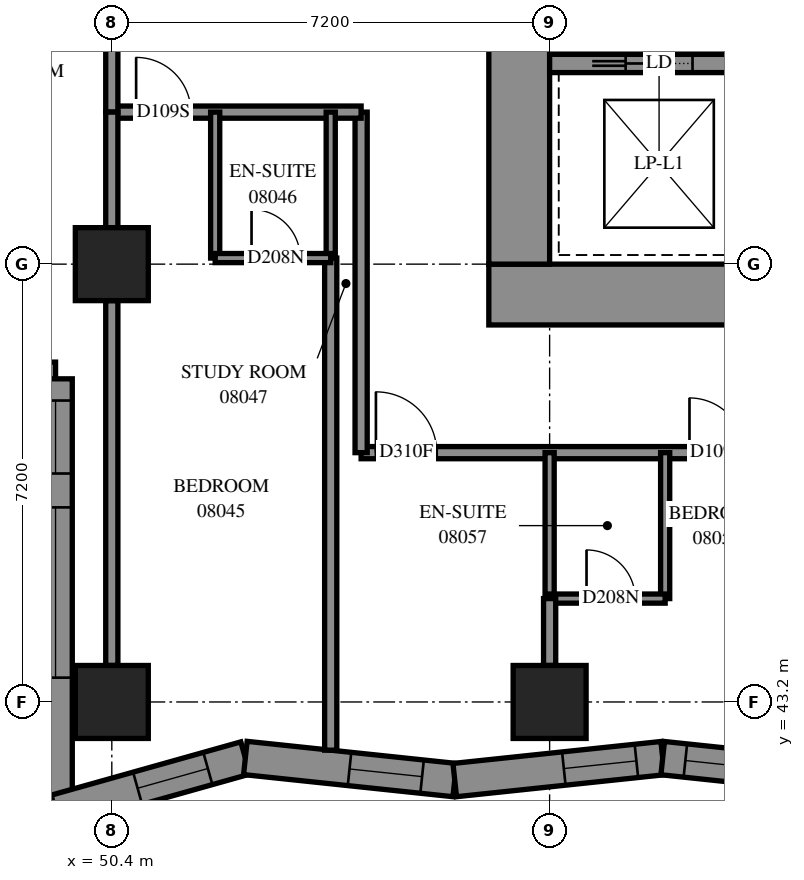
"""IFC4 building model, lengths in metres.
Left out: names, types, materials, properties, quantities, classifications, styles, units other than length and angle.
Written with IfcOpenShell. Run it as: python <this file> out.ifc"""

import sys

from ifc_helpers import new_model, si_unit, direction, frame, frame_2d, origin, origin_2d, place, context, subcontext, project, spatial, polyline, rectangle, outline, extrude, element, fill, save


model = new_model("IFC4")
c1 = context("Model", 3, precision=1e-05, world=origin(), true_north=direction((0.0, 1.0)))
c2 = subcontext(c1, "Body", "Model", "MODEL_VIEW")
j1 = project(units=[si_unit("LENGTHUNIT", "METRE"), si_unit("PLANEANGLEUNIT", "RADIAN")], contexts=[c1])
p1 = place(None, origin())
s1 = spatial("IfcSite", under=j1, at=p1, CompositionType="ELEMENT")
p2 = place(p1, origin())
s2 = spatial("IfcBuilding", under=s1, at=p2, CompositionType="ELEMENT")
p3 = place(p2, frame((0.0, 0.0, 33.8)))
s3 = spatial("IfcBuildingStorey", under=s2, at=p3, CompositionType="ELEMENT", Elevation=33.8)
for number, where, z_axis, x_axis in (
    (1, (50.4, 43.2, 0.0), (0.0, 0.0, 1.0), (1.0, 0.0, 0.0)),
    (2, (50.4, 50.4, 0.0), (0.0, 0.0, 1.0), (1.0, 0.0, 0.0)),
    (3, (57.6, 43.2, 0.0), (0.0, 0.0, 1.0), (1.0, 0.0, 0.0)),
):
    element("IfcColumn", number, at=place(p3, frame(where, z_axis=z_axis, x_axis=x_axis)), inside=s3, PredefinedType="COLUMN", context=c2, shape_type="SweptSolid", body=[
        extrude(rectangle(XDim=1.2, YDim=1.2, at=origin_2d()), origin(), (0.0, 0.0, 1.0), 3.1),
    ])
p4 = place(p3, frame((56.6, 49.9, -0.3), z_axis=(0.0, 0.0, 1.0), x_axis=(1.0, 0.0, 0.0)))
e4 = element("IfcWall", 4, at=p4, inside=s3, PredefinedType="SHEAR", context=c2, shape_type="SweptSolid", body=[
    extrude(rectangle(XDim=16.4, YDim=1.0, at=frame_2d((8.2, 0.0))), origin(), (0.0, 0.0, 1.0), 2.7),
])
p5 = place(p3, frame((57.1, 50.4, -0.3), z_axis=(0.0, 0.0, 1.0), x_axis=(0.0, 1.0, 0.0)))
e5 = element("IfcWall", 5, at=p5, inside=s3, PredefinedType="SHEAR", context=c2, shape_type="SweptSolid", body=[
    extrude(rectangle(XDim=14.4, YDim=1.0, at=frame_2d((7.2, 0.0))), origin(), (0.0, 0.0, 1.0), 2.7),
])
p6 = place(p5, frame((4.55, 0.0, 0.3)))
e6 = element("IfcOpeningElement", 6, at=p6, cuts=e5, PredefinedType="OPENING", context=c2, shape_type="SweptSolid", body=[
    extrude(rectangle(XDim=1.1, YDim=2.1, at=frame_2d((0.55, 1.05))), frame((0.0, 0.51, 0.0), z_axis=(0.0, -1.0, 0.0), x_axis=(1.0, 0.0, 0.0)), (0.0, 0.0, 1.0), 1.02),
])
p7 = place(p5, frame((11.35, 0.0, 0.3)))
e7 = element("IfcOpeningElement", 7, at=p7, cuts=e5, PredefinedType="OPENING", context=c2, shape_type="SweptSolid", body=[
    extrude(rectangle(XDim=1.1, YDim=2.1, at=frame_2d((0.55, 1.05))), frame((0.0, 0.51, 0.0), z_axis=(0.0, -1.0, 0.0), x_axis=(1.0, 0.0, 0.0)), (0.0, 0.0, 1.0), 1.02),
])
p8 = place(p3, frame((57.6, 53.7, 0.0), z_axis=(0.0, 0.0, 1.0), x_axis=(1.0, 0.0, 0.0)))
e8 = element("IfcWall", 8, at=p8, inside=s3, PredefinedType="SOLIDWALL", context=c2, shape_type="SweptSolid", body=[
    extrude(rectangle(XDim=14.4, YDim=0.3, at=frame_2d((7.2, 0.0))), origin(), (0.0, 0.0, 1.0), 3.1),
])
p9 = place(p8, frame((1.25, 0.0, 0.0)))
e9 = element("IfcOpeningElement", 9, at=p9, cuts=e8, PredefinedType="OPENING", context=c2, shape_type="SweptSolid", body=[
    extrude(rectangle(XDim=1.1, YDim=2.1, at=frame_2d((0.55, 1.05))), frame((0.0, 0.16, 0.0), z_axis=(0.0, -1.0, 0.0), x_axis=(1.0, 0.0, 0.0)), (0.0, 0.0, 1.0), 0.32),
])
p10 = place(p8, frame((4.85, 0.0, 0.0)))
e10 = element("IfcOpeningElement", 10, at=p10, cuts=e8, PredefinedType="OPENING", context=c2, shape_type="SweptSolid", body=[
    extrude(rectangle(XDim=1.1, YDim=2.1, at=frame_2d((0.55, 1.05))), frame((0.0, 0.16, 0.0), z_axis=(0.0, -1.0, 0.0), x_axis=(1.0, 0.0, 0.0)), (0.0, 0.0, 1.0), 0.32),
])
p11 = place(p8, frame((8.45, 0.0, 0.0)))
e11 = element("IfcOpeningElement", 11, at=p11, cuts=e8, PredefinedType="OPENING", context=c2, shape_type="SweptSolid", body=[
    extrude(rectangle(XDim=1.1, YDim=2.1, at=frame_2d((0.55, 1.05))), frame((0.0, 0.16, 0.0), z_axis=(0.0, -1.0, 0.0), x_axis=(1.0, 0.0, 0.0)), (0.0, 0.0, 1.0), 0.32),
])
p12 = place(p8, frame((12.05, 0.0, 0.0)))
e12 = element("IfcOpeningElement", 12, at=p12, cuts=e8, PredefinedType="OPENING", context=c2, shape_type="SweptSolid", body=[
    extrude(rectangle(XDim=1.1, YDim=2.1, at=frame_2d((0.55, 1.05))), frame((0.0, 0.16, 0.0), z_axis=(0.0, -1.0, 0.0), x_axis=(1.0, 0.0, 0.0)), (0.0, 0.0, 1.0), 0.32),
])
p13 = place(p3, frame((35.075, 48.514, 0.0), z_axis=(0.0, 0.0, 1.0), x_axis=(1.0, 0.0, 0.0)))
e13 = element("IfcWall", 13, at=p13, inside=s3, PredefinedType="SOLIDWALL", context=c2, shape_type="SweptSolid", body=[
    extrude(outline(polyline([(-0.275, -0.275), (14.125, -0.275), (14.675, 0.275), (0.275, 0.275), (-0.275, -0.275)])), origin(), (0.0, 0.0, 1.0), 3.1),
])
p14 = place(p13, frame((1.325, 0.0, 0.5)))
e14 = element("IfcOpeningElement", 14, at=p14, cuts=e13, PredefinedType="OPENING", context=c2, shape_type="SweptSolid", body=[
    extrude(rectangle(XDim=2.8, YDim=2.45, at=frame_2d((1.4, 1.225))), frame((0.0, 0.285, 0.0), z_axis=(0.0, -1.0, 0.0), x_axis=(1.0, 0.0, 0.0)), (0.0, 0.0, 1.0), 0.57),
])
p15 = place(p13, frame((4.925, 0.0, 0.5)))
e15 = element("IfcOpeningElement", 15, at=p15, cuts=e13, PredefinedType="OPENING", context=c2, shape_type="SweptSolid", body=[
    extrude(rectangle(XDim=2.8, YDim=2.45, at=frame_2d((1.4, 1.225))), frame((0.0, 0.285, 0.0), z_axis=(0.0, -1.0, 0.0), x_axis=(1.0, 0.0, 0.0)), (0.0, 0.0, 1.0), 0.57),
])
p16 = place(p13, frame((8.275, 0.0, 0.5)))
e16 = element("IfcOpeningElement", 16, at=p16, cuts=e13, PredefinedType="OPENING", context=c2, shape_type="SweptSolid", body=[
    extrude(rectangle(XDim=2.8, YDim=2.45, at=frame_2d((1.4, 1.225))), frame((0.0, 0.285, 0.0), z_axis=(0.0, -1.0, 0.0), x_axis=(1.0, 0.0, 0.0)), (0.0, 0.0, 1.0), 0.57),
])
p17 = place(p13, frame((12.363, 0.0, 0.5)))
e17 = element("IfcOpeningElement", 17, at=p17, cuts=e13, PredefinedType="OPENING", context=c2, shape_type="SweptSolid", body=[
    extrude(rectangle(XDim=1.2, YDim=2.45, at=frame_2d((0.6, 1.225))), frame((0.0, 0.285, 0.0), z_axis=(0.0, -1.0, 0.0), x_axis=(1.0, 0.0, 0.0)), (0.0, 0.0, 1.0), 0.57),
])
p18 = place(p3, frame((49.475, 48.514, 0.0), z_axis=(0.0, 0.0, 1.0), x_axis=(0.0, -1.0, 0.0)))
e18 = element("IfcWall", 18, at=p18, inside=s3, PredefinedType="SOLIDWALL", context=c2, shape_type="SweptSolid", body=[
    extrude(outline(polyline([(0.275, -0.275), (7.475, -0.275), (6.749, 0.275), (-0.275, 0.275), (0.275, -0.275)])), origin(), (0.0, 0.0, 1.0), 3.1),
])
p19 = place(p18, frame((2.114, 0.0, 0.5)))
e19 = element("IfcOpeningElement", 19, at=p19, cuts=e18, PredefinedType="OPENING", context=c2, shape_type="SweptSolid", body=[
    extrude(rectangle(XDim=2.8, YDim=2.45, at=frame_2d((1.4, 1.225))), frame((0.0, 0.285, 0.0), z_axis=(0.0, -1.0, 0.0), x_axis=(1.0, 0.0, 0.0)), (0.0, 0.0, 1.0), 0.57),
])
p20 = place(p18, frame((0.357, 0.0, 0.5)))
e20 = element("IfcOpeningElement", 20, at=p20, cuts=e18, PredefinedType="OPENING", context=c2, shape_type="SweptSolid", body=[
    extrude(rectangle(XDim=1.2, YDim=2.45, at=frame_2d((0.6, 1.225))), frame((0.0, 0.285, 0.0), z_axis=(0.0, -1.0, 0.0), x_axis=(1.0, 0.0, 0.0)), (0.0, 0.0, 1.0), 0.57),
])
p21 = place(p3, frame((49.475, 41.402, 0.0), z_axis=(0.0, 0.0, 1.0), x_axis=(0.9627079474, 0.2705428024, 0.0)))
e21 = element("IfcWall", 21, at=p21, inside=s3, PredefinedType="SOLIDWALL", context=c2, shape_type="SweptSolid", body=[
    extrude(outline(polyline([(-0.363, -0.275), (3.189, -0.275), (3.295, 0.275), (0.363, 0.275), (-0.363, -0.275)])), origin(), (0.0, 0.0, 1.0), 3.1),
])
p22 = place(p21, frame((1.401, 0.0, 0.5)))
e22 = element("IfcOpeningElement", 22, at=p22, cuts=e21, PredefinedType="OPENING", context=c2, shape_type="SweptSolid", body=[
    extrude(rectangle(XDim=1.2, YDim=2.45, at=frame_2d((0.6, 1.225))), frame((0.0, 0.285, 0.0), z_axis=(0.0, -1.0, 0.0), x_axis=(1.0, 0.0, 0.0)), (0.0, 0.0, 1.0), 0.57),
])
p23 = place(p3, frame((52.596, 42.279, 0.0), z_axis=(0.0, 0.0, 1.0), x_axis=(0.9944742336, -0.1049809444, 0.0)))
e23 = element("IfcWall", 23, at=p23, inside=s3, PredefinedType="SOLIDWALL", context=c2, shape_type="SweptSolid", body=[
    extrude(outline(polyline([(0.053, -0.275), (3.491, -0.275), (3.433, 0.275), (-0.053, 0.275), (0.053, -0.275)])), origin(), (0.0, 0.0, 1.0), 3.1),
])
p24 = place(p23, frame((1.723, 0.0, 0.5)))
e24 = element("IfcOpeningElement", 24, at=p24, cuts=e23, PredefinedType="OPENING", context=c2, shape_type="SweptSolid", body=[
    extrude(rectangle(XDim=1.2, YDim=2.45, at=frame_2d((0.6, 1.225))), frame((0.0, 0.285, 0.0), z_axis=(0.0, -1.0, 0.0), x_axis=(1.0, 0.0, 0.0)), (0.0, 0.0, 1.0), 0.57),
])
p25 = place(p3, frame((56.039, 41.916, 0.0), z_axis=(0.0, 0.0, 1.0), x_axis=(0.9944741767, 0.1049814831, 0.0)))
e25 = element("IfcWall", 25, at=p25, inside=s3, PredefinedType="SOLIDWALL", context=c2, shape_type="SweptSolid", body=[
    extrude(outline(polyline([(-0.029, -0.275), (3.41, -0.275), (3.468, 0.275), (0.029, 0.275), (-0.029, -0.275)])), origin(), (0.0, 0.0, 1.0), 3.1),
])
p26 = place(p25, frame((1.804, 0.0, 0.5)))
e26 = element("IfcOpeningElement", 26, at=p26, cuts=e25, PredefinedType="OPENING", context=c2, shape_type="SweptSolid", body=[
    extrude(rectangle(XDim=1.2, YDim=2.45, at=frame_2d((0.6, 1.225))), frame((0.0, 0.285, 0.0), z_axis=(0.0, -1.0, 0.0), x_axis=(1.0, 0.0, 0.0)), (0.0, 0.0, 1.0), 0.57),
])
p27 = place(p3, frame((59.459, 42.276, 0.0), z_axis=(0.0, 0.0, 1.0), x_axis=(0.9944741767, -0.1049814831, 0.0)))
e27 = element("IfcWall", 27, at=p27, inside=s3, PredefinedType="SOLIDWALL", context=c2, shape_type="SweptSolid", body=[
    extrude(outline(polyline([(0.029, -0.275), (3.468, -0.275), (3.41, 0.275), (-0.029, 0.275), (0.029, -0.275)])), origin(), (0.0, 0.0, 1.0), 3.1),
])
p28 = place(p27, frame((0.375, 0.0, 0.5)))
e28 = element("IfcOpeningElement", 28, at=p28, cuts=e27, PredefinedType="OPENING", context=c2, shape_type="SweptSolid", body=[
    extrude(rectangle(XDim=1.2, YDim=2.45, at=frame_2d((0.6, 1.225))), frame((0.0, 0.285, 0.0), z_axis=(0.0, -1.0, 0.0), x_axis=(1.0, 0.0, 0.0)), (0.0, 0.0, 1.0), 0.57),
])
p29 = place(p27, frame((1.88, 0.0, 0.5)))
e29 = element("IfcOpeningElement", 29, at=p29, cuts=e27, PredefinedType="OPENING", context=c2, shape_type="SweptSolid", body=[
    extrude(rectangle(XDim=1.2, YDim=2.45, at=frame_2d((0.6, 1.225))), frame((0.0, 0.285, 0.0), z_axis=(0.0, -1.0, 0.0), x_axis=(1.0, 0.0, 0.0)), (0.0, 0.0, 1.0), 0.57),
])
p30 = place(p3, frame((54.5, 47.3, 0.0), z_axis=(0.0, 0.0, 1.0), x_axis=(1.0, 0.0, 0.0)))
e30 = element("IfcWall", 30, at=p30, inside=s3, PredefinedType="PARTITIONING", context=c2, shape_type="SweptSolid", body=[
    extrude(rectangle(XDim=19.56, YDim=0.2, at=frame_2d((9.78, 0.0))), origin(), (0.0, 0.0, 1.0), 3.1),
])
p31 = place(p30, frame((0.243, 0.0, 0.0)))
e31 = element("IfcOpeningElement", 31, at=p31, cuts=e30, PredefinedType="OPENING", context=c2, shape_type="SweptSolid", body=[
    extrude(rectangle(XDim=1.0, YDim=2.1, at=frame_2d((0.5, 1.05))), frame((0.0, 0.11, 0.0), z_axis=(0.0, -1.0, 0.0), x_axis=(1.0, 0.0, 0.0)), (0.0, 0.0, 1.0), 0.22),
])
p32 = place(p30, frame((5.4, 0.0, 0.0)))
e32 = element("IfcOpeningElement", 32, at=p32, cuts=e30, PredefinedType="OPENING", context=c2, shape_type="SweptSolid", body=[
    extrude(rectangle(XDim=0.9, YDim=2.1, at=frame_2d((0.45, 1.05))), frame((0.0, 0.11, 0.0), z_axis=(0.0, -1.0, 0.0), x_axis=(1.0, 0.0, 0.0)), (0.0, 0.0, 1.0), 0.22),
])
p33 = place(p30, frame((7.1, 0.0, 0.0)))
e33 = element("IfcOpeningElement", 33, at=p33, cuts=e30, PredefinedType="OPENING", context=c2, shape_type="SweptSolid", body=[
    extrude(rectangle(XDim=0.9, YDim=2.1, at=frame_2d((0.45, 1.05))), frame((0.0, 0.11, 0.0), z_axis=(0.0, -1.0, 0.0), x_axis=(1.0, 0.0, 0.0)), (0.0, 0.0, 1.0), 0.22),
])
p34 = place(p30, frame((12.6, 0.0, 0.0)))
e34 = element("IfcOpeningElement", 34, at=p34, cuts=e30, PredefinedType="OPENING", context=c2, shape_type="SweptSolid", body=[
    extrude(rectangle(XDim=0.9, YDim=2.1, at=frame_2d((0.45, 1.05))), frame((0.0, 0.11, 0.0), z_axis=(0.0, -1.0, 0.0), x_axis=(1.0, 0.0, 0.0)), (0.0, 0.0, 1.0), 0.22),
])
p35 = place(p30, frame((14.3, 0.0, 0.0)))
e35 = element("IfcOpeningElement", 35, at=p35, cuts=e30, PredefinedType="OPENING", context=c2, shape_type="SweptSolid", body=[
    extrude(rectangle(XDim=0.9, YDim=2.1, at=frame_2d((0.45, 1.05))), frame((0.0, 0.11, 0.0), z_axis=(0.0, -1.0, 0.0), x_axis=(1.0, 0.0, 0.0)), (0.0, 0.0, 1.0), 0.22),
])
p36 = place(p3, frame((54.0, 42.407, 0.0), z_axis=(0.0, 0.0, 1.0), x_axis=(0.0, 1.0, 0.0)))
e36 = element("IfcWall", 36, at=p36, inside=s3, PredefinedType="PARTITIONING", context=c2, shape_type="SweptSolid", body=[
    extrude(rectangle(XDim=8.093, YDim=0.2, at=frame_2d((4.046, 0.0))), origin(), (0.0, 0.0, 1.0), 3.1),
])
p37 = place(p3, frame((50.4, 43.8, 0.0), z_axis=(0.0, 0.0, 1.0), x_axis=(0.0, 1.0, 0.0)))
e37 = element("IfcWall", 37, at=p37, inside=s3, PredefinedType="PARTITIONING", context=c2, shape_type="SweptSolid", body=[
    extrude(rectangle(XDim=6.0, YDim=0.2, at=frame_2d((3.0, 0.0))), origin(), (0.0, 0.0, 1.0), 2.6),
])
p38 = place(p3, frame((54.5, 47.3, 0.0), z_axis=(0.0, 0.0, 1.0), x_axis=(0.0, 1.0, 0.0)))
e38 = element("IfcWall", 38, at=p38, inside=s3, PredefinedType="PARTITIONING", context=c2, shape_type="SweptSolid", body=[
    extrude(rectangle(XDim=5.6, YDim=0.2, at=frame_2d((2.8, 0.0))), origin(), (0.0, 0.0, 1.0), 3.1),
])
p39 = place(p3, frame((50.4, 52.9, 0.0), z_axis=(0.0, 0.0, 1.0), x_axis=(1.0, 0.0, 0.0)))
e39 = element("IfcWall", 39, at=p39, inside=s3, PredefinedType="PARTITIONING", context=c2, shape_type="SweptSolid", body=[
    extrude(rectangle(XDim=4.1, YDim=0.2, at=frame_2d((2.05, 0.0))), origin(), (0.0, 0.0, 1.0), 3.1),
])
p40 = place(p39, frame((0.4, 0.0, 0.0)))
e40 = element("IfcOpeningElement", 40, at=p40, cuts=e39, PredefinedType="OPENING", context=c2, shape_type="SweptSolid", body=[
    extrude(rectangle(XDim=0.9, YDim=2.1, at=frame_2d((0.45, 1.05))), frame((0.0, 0.11, 0.0), z_axis=(0.0, -1.0, 0.0), x_axis=(1.0, 0.0, 0.0)), (0.0, 0.0, 1.0), 0.22),
])
for number, where, z_axis, x_axis in (
    (41, (52.1, 50.5, 0.0), (0.0, 0.0, 1.0), (0.0, 1.0, 0.0)),
    (42, (54.0, 50.5, 0.0), (0.0, 0.0, 1.0), (0.0, 1.0, 0.0)),
    (43, (59.5, 44.9, 0.0), (0.0, 0.0, 1.0), (0.0, 1.0, 0.0)),
    (44, (57.6, 44.9, 0.0), (0.0, 0.0, 1.0), (0.0, 1.0, 0.0)),
):
    element("IfcWall", number, at=place(p3, frame(where, z_axis=z_axis, x_axis=x_axis)), inside=s3, PredefinedType="PARTITIONING", context=c2, shape_type="SweptSolid", body=[
        extrude(rectangle(XDim=2.4, YDim=0.15, at=frame_2d((1.2, 0.0))), origin(), (0.0, 0.0, 1.0), 3.1),
    ])
p41 = place(p3, frame((50.4, 52.9, 0.0), z_axis=(0.0, 0.0, 1.0), x_axis=(0.0, 1.0, 0.0)))
e45 = element("IfcWall", 45, at=p41, inside=s3, PredefinedType="PARTITIONING", context=c2, shape_type="SweptSolid", body=[
    extrude(rectangle(XDim=2.2, YDim=0.2, at=frame_2d((1.1, 0.0))), origin(), (0.0, 0.0, 1.0), 3.1),
])
p42 = place(p3, frame((50.4, 51.0, 0.0), z_axis=(0.0, 0.0, 1.0), x_axis=(0.0, 1.0, 0.0)))
e46 = element("IfcWall", 46, at=p42, inside=s3, PredefinedType="PARTITIONING", context=c2, shape_type="SweptSolid", body=[
    extrude(rectangle(XDim=1.9, YDim=0.2, at=frame_2d((0.95, 0.0))), origin(), (0.0, 0.0, 1.0), 3.1),
])
p43 = place(p3, frame((52.1, 50.5, 0.0), z_axis=(0.0, 0.0, 1.0), x_axis=(1.0, 0.0, 0.0)))
e47 = element("IfcWall", 47, at=p43, inside=s3, PredefinedType="PARTITIONING", context=c2, shape_type="SweptSolid", body=[
    extrude(rectangle(XDim=1.9, YDim=0.15, at=frame_2d((0.95, 0.0))), origin(), (0.0, 0.0, 1.0), 3.1),
])
p44 = place(p43, frame((0.598, 0.0, 0.0)))
e48 = element("IfcOpeningElement", 48, at=p44, cuts=e47, PredefinedType="OPENING", context=c2, shape_type="SweptSolid", body=[
    extrude(rectangle(XDim=0.8, YDim=2.1, at=frame_2d((0.4, 1.05))), frame((0.0, 0.085, 0.0), z_axis=(0.0, -1.0, 0.0), x_axis=(1.0, 0.0, 0.0)), (0.0, 0.0, 1.0), 0.17),
])
p45 = place(p3, frame((57.6, 44.9, 0.0), z_axis=(0.0, 0.0, 1.0), x_axis=(1.0, 0.0, 0.0)))
e49 = element("IfcWall", 49, at=p45, inside=s3, PredefinedType="PARTITIONING", context=c2, shape_type="SweptSolid", body=[
    extrude(rectangle(XDim=1.9, YDim=0.15, at=frame_2d((0.95, 0.0))), origin(), (0.0, 0.0, 1.0), 3.1),
])
p46 = place(p45, frame((0.607, 0.0, 0.0)))
e50 = element("IfcOpeningElement", 50, at=p46, cuts=e49, PredefinedType="OPENING", context=c2, shape_type="SweptSolid", body=[
    extrude(rectangle(XDim=0.8, YDim=2.1, at=frame_2d((0.4, 1.05))), frame((0.0, 0.085, 0.0), z_axis=(0.0, -1.0, 0.0), x_axis=(1.0, 0.0, 0.0)), (0.0, 0.0, 1.0), 0.17),
])
p47 = place(p3, frame((57.6, 43.8, 0.0), z_axis=(0.0, 0.0, 1.0), x_axis=(0.0, 1.0, 0.0)))
e51 = element("IfcWall", 51, at=p47, inside=s3, PredefinedType="PARTITIONING", context=c2, shape_type="SweptSolid", body=[
    extrude(rectangle(XDim=1.1, YDim=0.2, at=frame_2d((0.55, 0.0))), origin(), (0.0, 0.0, 1.0), 3.1),
])
p48 = place(p19, origin())
e52 = element("IfcWindow", 52, at=p48, inside=s3, PartitioningType="SINGLE_PANEL", PredefinedType="WINDOW", context=c2, shape_type="SweptSolid", body=[
    extrude(rectangle(XDim=2.8, YDim=2.45, at=frame_2d((1.4, 1.225))), frame((0.0, 0.155, 0.0), z_axis=(0.0, -1.0, 0.0), x_axis=(1.0, 0.0, 0.0)), (0.0, 0.0, 1.0), 0.06),
])
fill(e19, e52)
p49 = place(p20, origin())
e53 = element("IfcWindow", 53, at=p49, inside=s3, PartitioningType="SINGLE_PANEL", PredefinedType="WINDOW", context=c2, shape_type="SweptSolid", body=[
    extrude(rectangle(XDim=1.2, YDim=2.45, at=frame_2d((0.6, 1.225))), frame((0.0, 0.155, 0.0), z_axis=(0.0, -1.0, 0.0), x_axis=(1.0, 0.0, 0.0)), (0.0, 0.0, 1.0), 0.06),
])
fill(e20, e53)
p50 = place(p22, origin())
e54 = element("IfcWindow", 54, at=p50, inside=s3, PartitioningType="SINGLE_PANEL", PredefinedType="WINDOW", context=c2, shape_type="SweptSolid", body=[
    extrude(rectangle(XDim=1.2, YDim=2.45, at=frame_2d((0.6, 1.225))), frame((0.0, 0.155, 0.0), z_axis=(0.0, -1.0, 0.0), x_axis=(1.0, 0.0, 0.0)), (0.0, 0.0, 1.0), 0.06),
])
fill(e22, e54)
p51 = place(p24, origin())
e55 = element("IfcWindow", 55, at=p51, inside=s3, PartitioningType="SINGLE_PANEL", PredefinedType="WINDOW", context=c2, shape_type="SweptSolid", body=[
    extrude(rectangle(XDim=1.2, YDim=2.45, at=frame_2d((0.6, 1.225))), frame((0.0, 0.155, 0.0), z_axis=(0.0, -1.0, 0.0), x_axis=(1.0, 0.0, 0.0)), (0.0, 0.0, 1.0), 0.06),
])
fill(e24, e55)
p52 = place(p26, origin())
e56 = element("IfcWindow", 56, at=p52, inside=s3, PartitioningType="SINGLE_PANEL", PredefinedType="WINDOW", context=c2, shape_type="SweptSolid", body=[
    extrude(rectangle(XDim=1.2, YDim=2.45, at=frame_2d((0.6, 1.225))), frame((0.0, 0.155, 0.0), z_axis=(0.0, -1.0, 0.0), x_axis=(1.0, 0.0, 0.0)), (0.0, 0.0, 1.0), 0.06),
])
fill(e26, e56)
p53 = place(p28, origin())
e57 = element("IfcWindow", 57, at=p53, inside=s3, PartitioningType="SINGLE_PANEL", PredefinedType="WINDOW", context=c2, shape_type="SweptSolid", body=[
    extrude(rectangle(XDim=1.2, YDim=2.45, at=frame_2d((0.6, 1.225))), frame((0.0, 0.155, 0.0), z_axis=(0.0, -1.0, 0.0), x_axis=(1.0, 0.0, 0.0)), (0.0, 0.0, 1.0), 0.06),
])
fill(e28, e57)
p54 = place(p9, origin())
e58 = element("IfcDoor", 58, at=p54, inside=s3, OperationType="SLIDING_TO_LEFT", PredefinedType="DOOR", context=c2, shape_type="SweptSolid", body=[
    extrude(rectangle(XDim=1.1, YDim=2.1, at=frame_2d((0.55, 1.05))), frame((0.0, 0.025, 0.0), z_axis=(0.0, -1.0, 0.0), x_axis=(1.0, 0.0, 0.0)), (0.0, 0.0, 1.0), 0.05),
])
fill(e9, e58)
p55 = place(p40, origin())
e59 = element("IfcDoor", 59, at=p55, inside=s3, OperationType="SINGLE_SWING_LEFT", PredefinedType="DOOR", context=c2, shape_type="SweptSolid", body=[
    extrude(rectangle(XDim=0.9, YDim=2.1, at=frame_2d((0.45, 1.05))), frame((0.0, 0.025, 0.0), z_axis=(0.0, -1.0, 0.0), x_axis=(1.0, 0.0, 0.0)), (0.0, 0.0, 1.0), 0.05),
])
fill(e40, e59)
p56 = place(p44, origin())
e60 = element("IfcDoor", 60, at=p56, inside=s3, OperationType="SINGLE_SWING_RIGHT", PredefinedType="DOOR", context=c2, shape_type="SweptSolid", body=[
    extrude(rectangle(XDim=0.8, YDim=2.1, at=frame_2d((0.4, 1.05))), frame((0.0, 0.025, 0.0), z_axis=(0.0, -1.0, 0.0), x_axis=(1.0, 0.0, 0.0)), (0.0, 0.0, 1.0), 0.05),
])
fill(e48, e60)
p57 = place(p31, origin())
e61 = element("IfcDoor", 61, at=p57, inside=s3, OperationType="SINGLE_SWING_RIGHT", PredefinedType="DOOR", context=c2, shape_type="SweptSolid", body=[
    extrude(rectangle(XDim=1.0, YDim=2.1, at=frame_2d((0.5, 1.05))), frame((0.0, 0.025, 0.0), z_axis=(0.0, -1.0, 0.0), x_axis=(1.0, 0.0, 0.0)), (0.0, 0.0, 1.0), 0.05),
])
fill(e31, e61)
p58 = place(p32, origin())
e62 = element("IfcDoor", 62, at=p58, inside=s3, OperationType="SINGLE_SWING_LEFT", PredefinedType="DOOR", context=c2, shape_type="SweptSolid", body=[
    extrude(rectangle(XDim=0.9, YDim=2.1, at=frame_2d((0.45, 1.05))), frame((0.0, 0.025, 0.0), z_axis=(0.0, -1.0, 0.0), x_axis=(1.0, 0.0, 0.0)), (0.0, 0.0, 1.0), 0.05),
])
fill(e32, e62)
p59 = place(p46, origin())
e63 = element("IfcDoor", 63, at=p59, inside=s3, OperationType="SINGLE_SWING_RIGHT", PredefinedType="DOOR", context=c2, shape_type="SweptSolid", body=[
    extrude(rectangle(XDim=0.8, YDim=2.1, at=frame_2d((0.4, 1.05))), frame((0.0, 0.025, 0.0), z_axis=(0.0, -1.0, 0.0), x_axis=(1.0, 0.0, 0.0)), (0.0, 0.0, 1.0), 0.05),
])
fill(e50, e63)
save(model, sys.argv[1])
